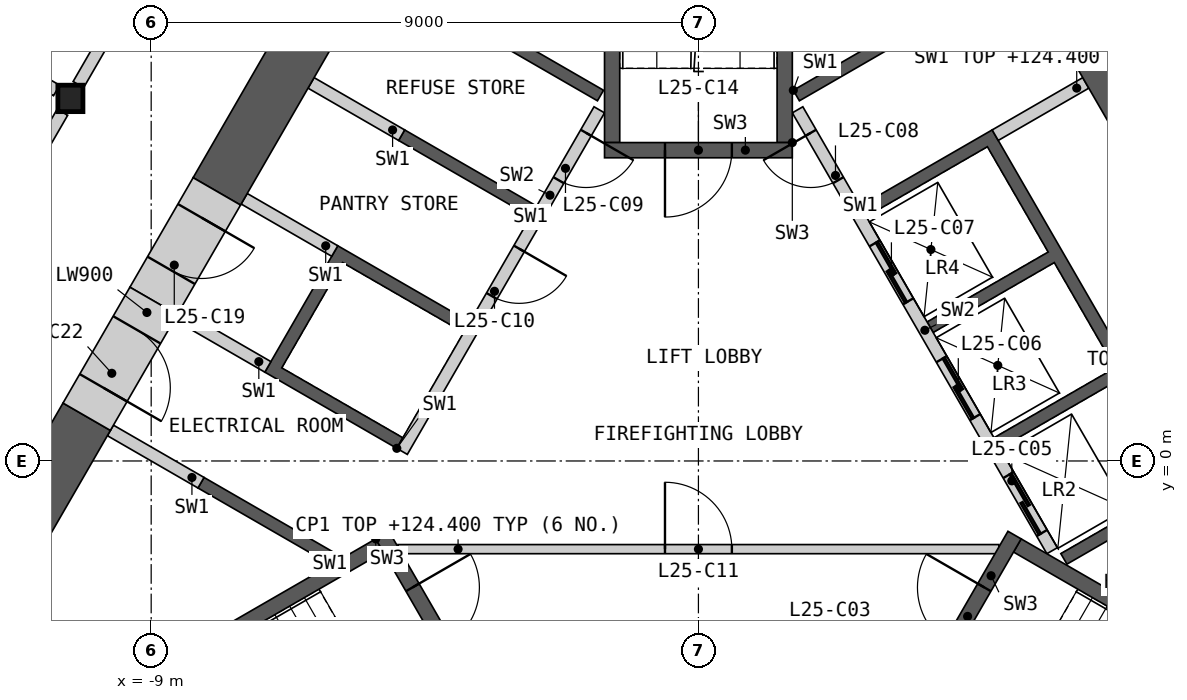
"""IFC4 building model, lengths in metres.
Left out: names, types, materials, properties, quantities, classifications, styles, units other than length and angle.
Written with IfcOpenShell. Run it as: python <this file> out.ifc"""

import sys

from ifc_helpers import new_model, si_unit, direction, frame, frame_2d, origin, origin_2d, place, context, subcontext, project, spatial, polyline, rectangle, i_section, outline, extrude, element, fill, save


model = new_model("IFC4")
c1 = context("Model", 3, precision=1e-05, world=origin(), true_north=direction((0.0, 1.0)))
c2 = subcontext(c1, "Body", "Model", "MODEL_VIEW")
j1 = project(units=[si_unit("LENGTHUNIT", "METRE"), si_unit("PLANEANGLEUNIT", "RADIAN")], contexts=[c1])
p1 = place(None, origin())
s1 = spatial("IfcSite", under=j1, at=p1, CompositionType="ELEMENT")
p2 = place(p1, origin())
s2 = spatial("IfcBuilding", under=s1, at=p2, CompositionType="ELEMENT")
p3 = place(p2, frame((0.0, 0.0, 120.6)))
s3 = spatial("IfcBuildingStorey", under=s2, at=p3, CompositionType="ELEMENT", Elevation=120.6)
p4 = place(p3, frame((-10.328, 5.963, 0.0), z_axis=(0.0, 0.0, 1.0), x_axis=(1.0, 0.0, 0.0)))
e1 = element("IfcColumn", 1, at=p4, inside=s3, PredefinedType="COLUMN", context=c2, shape_type="SweptSolid", body=[
    extrude(i_section(OverallWidth=0.412, OverallDepth=0.435, WebThickness=0.036, FlangeThickness=0.057, at=origin_2d()), origin(), (0.0, 0.0, 1.0), 4.2),
])
p5 = place(p3, origin())
e2 = element("IfcWall", 2, at=p5, inside=s3, PredefinedType="SHEAR", context=c2, shape_type="SweptSolid", body=[
    extrude(outline(polyline([(1.561, 6.097), (3.731, 7.35), (3.831, 7.177), (1.66, 5.924), (1.561, 6.097)])), origin(), (0.0, 0.0, 1.0), 3.8),
])
p6 = place(p3, origin())
e3 = element("IfcWall", 3, at=p6, inside=s3, PredefinedType="SHEAR", context=c2, shape_type="SweptSolid", body=[
    extrude(outline(polyline([(2.66, 4.192), (4.831, 5.445), (8.231, -0.444), (6.061, -1.697), (5.96, -1.524), (7.952, -0.374), (6.952, 1.358), (4.96, 0.208), (4.861, 0.381), (6.852, 1.531), (5.852, 3.263), (3.861, 2.113), (3.76, 2.287), (5.752, 3.437), (4.752, 5.169), (2.76, 4.019), (2.66, 4.192)])), origin(), (0.0, 0.0, 1.0), 3.8),
])
p7 = place(p3, frame((5.817, -1.476, 0.0), z_axis=(0.0, 0.0, 1.0), x_axis=(-0.500002616675, 0.866023893041, 0.0)))
e4 = element("IfcWall", 4, at=p7, inside=s3, PredefinedType="SOLIDWALL", context=c2, shape_type="SweptSolid", body=[
    extrude(rectangle(XDim=8.373, YDim=0.2, at=frame_2d((4.187, 0.0))), origin(), (0.0, 0.0, 1.0), 3.8),
])
p8 = place(p7, frame((0.337, 0.0, 0.0)))
e5 = element("IfcOpeningElement", 5, at=p8, cuts=e4, PredefinedType="OPENING", context=c2, shape_type="SweptSolid", body=[
    extrude(rectangle(XDim=1.1, YDim=2.1, at=frame_2d((0.55, 1.05))), frame((0.0, 0.11, 0.0), z_axis=(0.0, -1.0, 0.0), x_axis=(1.0, 0.0, 0.0)), (0.0, 0.0, 1.0), 0.22),
])
p9 = place(p7, frame((2.537, 0.0, 0.0)))
e6 = element("IfcOpeningElement", 6, at=p9, cuts=e4, PredefinedType="OPENING", context=c2, shape_type="SweptSolid", body=[
    extrude(rectangle(XDim=1.1, YDim=2.1, at=frame_2d((0.55, 1.05))), frame((0.0, 0.11, 0.0), z_axis=(0.0, -1.0, 0.0), x_axis=(1.0, 0.0, 0.0)), (0.0, 0.0, 1.0), 0.22),
])
p10 = place(p7, frame((4.737, 0.0, 0.0)))
e7 = element("IfcOpeningElement", 7, at=p10, cuts=e4, PredefinedType="OPENING", context=c2, shape_type="SweptSolid", body=[
    extrude(rectangle(XDim=1.1, YDim=2.1, at=frame_2d((0.55, 1.05))), frame((0.0, 0.11, 0.0), z_axis=(0.0, -1.0, 0.0), x_axis=(1.0, 0.0, 0.0)), (0.0, 0.0, 1.0), 0.22),
])
p11 = place(p7, frame((7.037, 0.0, 0.0)))
e8 = element("IfcOpeningElement", 8, at=p11, cuts=e4, PredefinedType="OPENING", context=c2, shape_type="SweptSolid", body=[
    extrude(rectangle(XDim=0.9, YDim=2.1, at=frame_2d((0.45, 1.05))), frame((0.0, 0.11, 0.0), z_axis=(0.0, -1.0, 0.0), x_axis=(1.0, 0.0, 0.0)), (0.0, 0.0, 1.0), 0.22),
])
p12 = place(p3, frame((4.881, 5.358, 0.0), z_axis=(0.0, 0.0, 1.0), x_axis=(0.866024871741, 0.500000921525, 0.0)))
e9 = element("IfcWall", 9, at=p12, inside=s3, PredefinedType="SHEAR", context=c2, shape_type="SweptSolid", body=[
    extrude(rectangle(XDim=1.72, YDim=0.2, at=frame_2d((0.86, 0.0))), origin(), (0.0, 0.0, 1.0), 3.8),
])
p13 = place(p3, origin())
e10 = element("IfcWall", 10, at=p13, inside=s3, PredefinedType="SHEAR", context=c2, shape_type="SweptSolid", body=[
    extrude(outline(polyline([(-6.061, -1.697), (-8.231, -0.444), (-8.131, -0.271), (-5.96, -1.524), (-6.061, -1.697)])), origin(), (0.0, 0.0, 1.0), 3.8),
])
p14 = place(p3, origin())
e11 = element("IfcWall", 11, at=p14, inside=s3, PredefinedType="SHEAR", context=c2, shape_type="SweptSolid", body=[
    extrude(outline(polyline([(-4.96, 0.208), (-7.131, 1.461), (-5.931, 3.54), (-3.76, 2.287), (-3.861, 2.113), (-5.852, 3.263), (-6.852, 1.531), (-4.861, 0.381), (-4.96, 0.208)])), origin(), (0.0, 0.0, 1.0), 3.8),
])
p15 = place(p3, origin())
e12 = element("IfcWall", 12, at=p15, inside=s3, PredefinedType="SHEAR", context=c2, shape_type="SweptSolid", body=[
    extrude(outline(polyline([(-2.76, 4.019), (-4.931, 5.272), (-4.831, 5.445), (-2.66, 4.192), (-2.76, 4.019)])), origin(), (0.0, 0.0, 1.0), 3.8),
])
p16 = place(p3, origin())
e13 = element("IfcWall", 13, at=p16, inside=s3, PredefinedType="SHEAR", context=c2, shape_type="SweptSolid", body=[
    extrude(outline(polyline([(-3.731, 7.35), (-1.561, 6.097), (-1.66, 5.924), (-3.831, 7.177), (-3.731, 7.35)])), origin(), (0.0, 0.0, 1.0), 3.8),
])
p17 = place(p3, frame((-1.631, 5.776, 0.0), z_axis=(0.0, 0.0, 1.0), x_axis=(-0.499992876559, -0.866029516466, 0.0)))
e14 = element("IfcWall", 14, at=p17, inside=s3, PredefinedType="SOLIDWALL", context=c2, shape_type="SweptSolid", body=[
    extrude(rectangle(XDim=6.486, YDim=0.2, at=frame_2d((3.243, 0.0))), origin(), (0.0, 0.0, 1.0), 3.8),
])
p18 = place(p17, frame((0.437, 0.0, 0.0)))
e15 = element("IfcOpeningElement", 15, at=p18, cuts=e14, PredefinedType="OPENING", context=c2, shape_type="SweptSolid", body=[
    extrude(rectangle(XDim=0.9, YDim=2.1, at=frame_2d((0.45, 1.05))), frame((0.0, 0.11, 0.0), z_axis=(0.0, -1.0, 0.0), x_axis=(1.0, 0.0, 0.0)), (0.0, 0.0, 1.0), 0.22),
])
p19 = place(p17, frame((2.637, 0.0, 0.0)))
e16 = element("IfcOpeningElement", 16, at=p19, cuts=e14, PredefinedType="OPENING", context=c2, shape_type="SweptSolid", body=[
    extrude(rectangle(XDim=0.9, YDim=2.1, at=frame_2d((0.45, 1.05))), frame((0.0, 0.11, 0.0), z_axis=(0.0, -1.0, 0.0), x_axis=(1.0, 0.0, 0.0)), (0.0, 0.0, 1.0), 0.22),
])
p20 = place(p3, frame((-4.881, 5.358, 0.0), z_axis=(0.0, 0.0, 1.0), x_axis=(-0.866024871741, 0.500000921525, 0.0)))
e17 = element("IfcWall", 17, at=p20, inside=s3, PredefinedType="SHEAR", context=c2, shape_type="SweptSolid", body=[
    extrude(rectangle(XDim=1.72, YDim=0.2, at=frame_2d((0.86, 0.0))), origin(), (0.0, 0.0, 1.0), 3.8),
])
p21 = place(p3, frame((-5.981, 3.453, 0.0), z_axis=(0.0, 0.0, 1.0), x_axis=(-0.866060346521, 0.499939472521, 0.0)))
e18 = element("IfcWall", 18, at=p21, inside=s3, PredefinedType="SHEAR", context=c2, shape_type="SweptSolid", body=[
    extrude(rectangle(XDim=1.72, YDim=0.2, at=frame_2d((0.86, 0.0))), origin(), (0.0, 0.0, 1.0), 3.8),
])
for number, where, z_axis, x_axis in (
    (19, (-7.081, 1.548, 0.0), (0.0, 0.0, 1.0), (-0.866, 0.5, 0.0)),
    (20, (-8.181, -0.357, 0.0), (0.0, 0.0, 1.0), (-0.866, 0.5, 0.0)),
):
    element("IfcWall", number, at=place(p3, frame(where, z_axis=z_axis, x_axis=x_axis)), inside=s3, PredefinedType="SHEAR", context=c2, shape_type="SweptSolid", body=[
        extrude(rectangle(XDim=1.72, YDim=0.2, at=frame_2d((0.86, 0.0))), origin(), (0.0, 0.0, 1.0), 3.8),
    ])
p22 = place(p3, frame((-4.941, -1.45, 0.0), z_axis=(0.0, 0.0, 1.0), x_axis=(1.0, 0.0, 0.0)))
e21 = element("IfcWall", 21, at=p22, inside=s3, PredefinedType="PARTITIONING", context=c2, shape_type="SweptSolid", body=[
    extrude(rectangle(XDim=9.882, YDim=0.15, at=frame_2d((4.941, 0.0))), origin(), (0.0, 0.0, 1.0), 3.8),
])
p23 = place(p22, frame((4.391, 0.0, 0.0)))
e22 = element("IfcOpeningElement", 22, at=p23, cuts=e21, PredefinedType="OPENING", context=c2, shape_type="SweptSolid", body=[
    extrude(rectangle(XDim=1.1, YDim=2.1, at=frame_2d((0.55, 1.05))), frame((0.0, 0.085, 0.0), z_axis=(0.0, -1.0, 0.0), x_axis=(1.0, 0.0, 0.0)), (0.0, 0.0, 1.0), 0.17),
])
p24 = place(p3, origin())
e23 = element("IfcWall", 23, at=p24, inside=s3, PredefinedType="SHEAR", context=c2, shape_type="SweptSolid", body=[
    extrude(outline(polyline([(-5.307, -1.281), (-10.374, -4.206), (-10.032, -4.298), (-5.182, -1.498), (-5.307, -1.281)])), origin(), (0.0, 0.0, 1.0), 3.8),
])
p25 = place(p3, frame((-5.199, -1.219, 0.0), z_axis=(0.0, 0.0, 1.0), x_axis=(0.499982516597, -0.866035497597, 0.0)))
e24 = element("IfcWall", 24, at=p25, inside=s3, PredefinedType="SHEAR", context=c2, shape_type="SweptSolid", body=[
    extrude(rectangle(XDim=3.088, YDim=0.25, at=frame_2d((1.544, 0.0))), origin(), (0.0, 0.0, 1.0), 3.8),
])
p26 = place(p25, frame((0.994, 0.0, 0.0)))
e25 = element("IfcOpeningElement", 25, at=p26, cuts=e24, PredefinedType="OPENING", context=c2, shape_type="SweptSolid", body=[
    extrude(rectangle(XDim=1.1, YDim=2.1, at=frame_2d((0.55, 1.05))), frame((0.0, 0.135, 0.0), z_axis=(0.0, -1.0, 0.0), x_axis=(1.0, 0.0, 0.0)), (0.0, 0.0, 1.0), 0.27),
])
p27 = place(p3, origin())
e26 = element("IfcWall", 26, at=p27, inside=s3, PredefinedType="SHEAR", context=c2, shape_type="SweptSolid", body=[
    extrude(outline(polyline([(10.032, -4.298), (10.374, -4.206), (5.307, -1.281), (5.182, -1.498), (10.032, -4.298)])), origin(), (0.0, 0.0, 1.0), 3.8),
])
p28 = place(p3, frame((3.655, -3.893, 0.0), z_axis=(0.0, 0.0, 1.0), x_axis=(0.499982516597, 0.866035497597, 0.0)))
e27 = element("IfcWall", 27, at=p28, inside=s3, PredefinedType="SHEAR", context=c2, shape_type="SweptSolid", body=[
    extrude(rectangle(XDim=3.088, YDim=0.25, at=frame_2d((1.544, 0.0))), origin(), (0.0, 0.0, 1.0), 3.8),
])
p29 = place(p28, frame((0.994, 0.0, 0.0)))
e28 = element("IfcOpeningElement", 28, at=p29, cuts=e27, PredefinedType="OPENING", context=c2, shape_type="SweptSolid", body=[
    extrude(rectangle(XDim=1.1, YDim=2.1, at=frame_2d((0.55, 1.05))), frame((0.0, 0.135, 0.0), z_axis=(0.0, -1.0, 0.0), x_axis=(1.0, 0.0, 0.0)), (0.0, 0.0, 1.0), 0.27),
])
p30 = place(p3, origin())
e29 = element("IfcWall", 29, at=p30, inside=s3, PredefinedType="SHEAR", context=c2, shape_type="SweptSolid", body=[
    extrude(outline(polyline([(1.544, 5.237), (1.544, 11.087), (1.294, 10.837), (1.294, 5.237), (1.544, 5.237)])), origin(), (0.0, 0.0, 1.0), 3.8),
])
p31 = place(p3, origin())
e30 = element("IfcWall", 30, at=p31, inside=s3, PredefinedType="SHEAR", context=c2, shape_type="SweptSolid", body=[
    extrude(outline(polyline([(-1.294, 10.837), (-1.544, 11.087), (-1.544, 5.237), (-1.294, 5.237), (-1.294, 10.837)])), origin(), (0.0, 0.0, 1.0), 3.8),
])
p32 = place(p3, frame((1.544, 5.112, 0.0), z_axis=(0.0, 0.0, 1.0), x_axis=(-1.0, 0.0, 0.0)))
e31 = element("IfcWall", 31, at=p32, inside=s3, PredefinedType="SHEAR", context=c2, shape_type="SweptSolid", body=[
    extrude(rectangle(XDim=3.088, YDim=0.25, at=frame_2d((1.544, 0.0))), origin(), (0.0, 0.0, 1.0), 3.8),
])
p33 = place(p32, frame((0.994, 0.0, 0.0)))
e32 = element("IfcOpeningElement", 32, at=p33, cuts=e31, PredefinedType="OPENING", context=c2, shape_type="SweptSolid", body=[
    extrude(rectangle(XDim=1.1, YDim=2.1, at=frame_2d((0.55, 1.05))), frame((0.0, 0.135, 0.0), z_axis=(0.0, -1.0, 0.0), x_axis=(1.0, 0.0, 0.0)), (0.0, 0.0, 1.0), 0.27),
])
p34 = place(p3, frame((7.91, 4.451, 0.0), z_axis=(0.0, 0.0, 1.0), x_axis=(-0.500005799286, 0.866022055539, 0.0)))
e33 = element("IfcWall", 33, at=p34, inside=s3, PredefinedType="SHEAR", context=c2, shape_type="SweptSolid", body=[
    extrude(rectangle(XDim=15.041, YDim=0.9, at=frame_2d((7.521, 0.0))), origin(), (0.0, 0.0, 1.0), 3.8),
])
p35 = place(p3, frame((-3.55, 12.004, 0.0), z_axis=(0.0, 0.0, 1.0), x_axis=(-0.499993245289, -0.866029303583, 0.0)))
e34 = element("IfcWall", 34, at=p35, inside=s3, PredefinedType="SHEAR", context=c2, shape_type="SweptSolid", body=[
    extrude(rectangle(XDim=8.741, YDim=0.9, at=frame_2d((4.37, 0.0))), origin(), (0.0, 0.0, 1.0), 3.8),
])
p36 = place(p3, frame((-10.06, 0.728, 0.0), z_axis=(0.0, 0.0, 1.0), x_axis=(-0.500021220092, -0.866013152012, 0.0)))
e35 = element("IfcWall", 35, at=p36, inside=s3, PredefinedType="SHEAR", context=c2, shape_type="SweptSolid", body=[
    extrude(rectangle(XDim=4.22, YDim=0.9, at=frame_2d((2.11, 0.0))), origin(), (0.0, 0.0, 1.0), 3.8),
])
p37 = place(p3, frame((-7.92, 4.434, 0.0), z_axis=(0.0, 0.0, 1.0), x_axis=(-0.499939227269, -0.866060488094, 0.0)))
e36 = element("IfcWall", 36, at=p37, inside=s3, PredefinedType="SHEAR", context=c2, shape_type="SweptSolid", body=[
    extrude(rectangle(XDim=2.08, YDim=0.9, at=frame_2d((1.04, 0.0))), origin(), (0.0, 0.0, 1.0), 3.8),
])
p38 = place(p37, frame((0.5, 0.0, 0.0)))
e37 = element("IfcOpeningElement", 37, at=p38, cuts=e36, PredefinedType="OPENING", context=c2, shape_type="SweptSolid", body=[
    extrude(rectangle(XDim=1.0, YDim=2.1, at=frame_2d((0.5, 1.05))), frame((0.0, 0.46, 0.0), z_axis=(0.0, -1.0, 0.0), x_axis=(1.0, 0.0, 0.0)), (0.0, 0.0, 1.0), 0.92),
])
p39 = place(p3, frame((-8.96, 2.633, 0.0), z_axis=(0.0, 0.0, 1.0), x_axis=(-0.50002983664, -0.866008176907, 0.0)))
e38 = element("IfcWall", 38, at=p39, inside=s3, PredefinedType="SHEAR", context=c2, shape_type="SweptSolid", body=[
    extrude(rectangle(XDim=2.2, YDim=0.9, at=frame_2d((1.1, 0.0))), origin(), (0.0, 0.0, 1.0), 3.8),
])
p40 = place(p39, frame((0.55, 0.0, 0.0)))
e39 = element("IfcOpeningElement", 39, at=p40, cuts=e38, PredefinedType="OPENING", context=c2, shape_type="SweptSolid", body=[
    extrude(rectangle(XDim=1.1, YDim=2.1, at=frame_2d((0.55, 1.05))), frame((0.0, 0.46, 0.0), z_axis=(0.0, -1.0, 0.0), x_axis=(1.0, 0.0, 0.0)), (0.0, 0.0, 1.0), 0.92),
])
p41 = place(p3, frame((-10.197, 6.19, 0.0), z_axis=(0.0, 0.0, 1.0), x_axis=(0.500012035596, 0.866018454918, 0.0)))
e40 = element("IfcWall", 40, at=p41, inside=s3, PredefinedType="PARTITIONING", context=c2, shape_type="SweptSolid", body=[
    extrude(rectangle(XDim=9.803, YDim=0.2, at=frame_2d((4.902, 0.0))), origin(), (0.0, 0.0, 1.0), 3.8),
])
p42 = place(p41, frame((1.851, 0.0, 0.0)))
e41 = element("IfcOpeningElement", 41, at=p42, cuts=e40, PredefinedType="OPENING", context=c2, shape_type="SweptSolid", body=[
    extrude(rectangle(XDim=1.0, YDim=2.1, at=frame_2d((0.5, 1.05))), frame((0.0, 0.11, 0.0), z_axis=(0.0, -1.0, 0.0), x_axis=(1.0, 0.0, 0.0)), (0.0, 0.0, 1.0), 0.22),
])
p43 = place(p3, frame((5.295, 14.68, 0.0), z_axis=(0.0, 0.0, 1.0), x_axis=(0.500012035596, -0.866018454918, 0.0)))
e42 = element("IfcWall", 42, at=p43, inside=s3, PredefinedType="PARTITIONING", context=c2, shape_type="SweptSolid", body=[
    extrude(rectangle(XDim=9.803, YDim=0.2, at=frame_2d((4.902, 0.0))), origin(), (0.0, 0.0, 1.0), 3.8),
])
p44 = place(p43, frame((4.376, 0.0, 0.0)))
e43 = element("IfcOpeningElement", 43, at=p44, cuts=e42, PredefinedType="OPENING", context=c2, shape_type="SweptSolid", body=[
    extrude(rectangle(XDim=0.95, YDim=2.1, at=frame_2d((0.475, 1.05))), frame((0.0, 0.11, 0.0), z_axis=(0.0, -1.0, 0.0), x_axis=(1.0, 0.0, 0.0)), (0.0, 0.0, 1.0), 0.22),
])
p45 = place(p3, frame((-15.402, -2.823, 0.0), z_axis=(0.0, 0.0, 1.0), x_axis=(0.500023237168, 0.866011987384, 0.0)))
e44 = element("IfcWall", 44, at=p45, inside=s3, PredefinedType="PARTITIONING", context=c2, shape_type="SweptSolid", body=[
    extrude(rectangle(XDim=9.883, YDim=0.2, at=frame_2d((4.942, 0.0))), origin(), (0.0, 0.0, 1.0), 3.8),
])
p46 = place(p45, frame((4.492, 0.0, 0.0)))
e45 = element("IfcOpeningElement", 45, at=p46, cuts=e44, PredefinedType="OPENING", context=c2, shape_type="SweptSolid", body=[
    extrude(rectangle(XDim=1.0, YDim=2.1, at=frame_2d((0.5, 1.05))), frame((0.0, 0.11, 0.0), z_axis=(0.0, -1.0, 0.0), x_axis=(1.0, 0.0, 0.0)), (0.0, 0.0, 1.0), 0.22),
])
p47 = place(p3, frame((-21.536, 12.434, 0.0), z_axis=(0.0, 0.0, 1.0), x_axis=(0.86602461759, -0.500001361726, 0.0)))
e46 = element("IfcWall", 46, at=p47, inside=s3, PredefinedType="PARTITIONING", context=c2, shape_type="SweptSolid", body=[
    extrude(rectangle(XDim=12.679, YDim=0.2, at=frame_2d((6.34, 0.0))), origin(), (0.0, 0.0, 1.0), 2.885),
])
p48 = place(p8, origin())
e47 = element("IfcDoor", 47, at=p48, inside=s3, OperationType="SLIDING_TO_LEFT", PredefinedType="DOOR", context=c2, shape_type="SweptSolid", body=[
    extrude(rectangle(XDim=1.1, YDim=2.1, at=frame_2d((0.55, 1.05))), frame((0.0, 0.025, 0.0), z_axis=(0.0, -1.0, 0.0), x_axis=(1.0, 0.0, 0.0)), (0.0, 0.0, 1.0), 0.05),
])
fill(e5, e47)
p49 = place(p9, origin())
e48 = element("IfcDoor", 48, at=p49, inside=s3, OperationType="SLIDING_TO_LEFT", PredefinedType="DOOR", context=c2, shape_type="SweptSolid", body=[
    extrude(rectangle(XDim=1.1, YDim=2.1, at=frame_2d((0.55, 1.05))), frame((0.0, 0.025, 0.0), z_axis=(0.0, -1.0, 0.0), x_axis=(1.0, 0.0, 0.0)), (0.0, 0.0, 1.0), 0.05),
])
fill(e6, e48)
p50 = place(p10, origin())
e49 = element("IfcDoor", 49, at=p50, inside=s3, OperationType="SLIDING_TO_LEFT", PredefinedType="DOOR", context=c2, shape_type="SweptSolid", body=[
    extrude(rectangle(XDim=1.1, YDim=2.1, at=frame_2d((0.55, 1.05))), frame((0.0, 0.025, 0.0), z_axis=(0.0, -1.0, 0.0), x_axis=(1.0, 0.0, 0.0)), (0.0, 0.0, 1.0), 0.05),
])
fill(e7, e49)
p51 = place(p11, origin())
e50 = element("IfcDoor", 50, at=p51, inside=s3, OperationType="SINGLE_SWING_RIGHT", PredefinedType="DOOR", context=c2, shape_type="SweptSolid", body=[
    extrude(rectangle(XDim=0.9, YDim=2.1, at=frame_2d((0.45, 1.05))), frame((0.0, 0.025, 0.0), z_axis=(0.0, -1.0, 0.0), x_axis=(1.0, 0.0, 0.0)), (0.0, 0.0, 1.0), 0.05),
])
fill(e8, e50)
p52 = place(p18, origin())
e51 = element("IfcDoor", 51, at=p52, inside=s3, OperationType="SINGLE_SWING_LEFT", PredefinedType="DOOR", context=c2, shape_type="SweptSolid", body=[
    extrude(rectangle(XDim=0.9, YDim=2.1, at=frame_2d((0.45, 1.05))), frame((0.0, 0.025, 0.0), z_axis=(0.0, -1.0, 0.0), x_axis=(1.0, 0.0, 0.0)), (0.0, 0.0, 1.0), 0.05),
])
fill(e15, e51)
p53 = place(p19, origin())
e52 = element("IfcDoor", 52, at=p53, inside=s3, OperationType="SINGLE_SWING_LEFT", PredefinedType="DOOR", context=c2, shape_type="SweptSolid", body=[
    extrude(rectangle(XDim=0.9, YDim=2.1, at=frame_2d((0.45, 1.05))), frame((0.0, 0.025, 0.0), z_axis=(0.0, -1.0, 0.0), x_axis=(1.0, 0.0, 0.0)), (0.0, 0.0, 1.0), 0.05),
])
fill(e16, e52)
p54 = place(p23, origin())
e53 = element("IfcDoor", 53, at=p54, inside=s3, OperationType="SINGLE_SWING_LEFT", PredefinedType="DOOR", context=c2, shape_type="SweptSolid", body=[
    extrude(rectangle(XDim=1.1, YDim=2.1, at=frame_2d((0.55, 1.05))), frame((0.0, 0.025, 0.0), z_axis=(0.0, -1.0, 0.0), x_axis=(1.0, 0.0, 0.0)), (0.0, 0.0, 1.0), 0.05),
])
fill(e22, e53)
p55 = place(p26, origin())
e54 = element("IfcDoor", 54, at=p55, inside=s3, OperationType="SINGLE_SWING_LEFT", PredefinedType="DOOR", context=c2, shape_type="SweptSolid", body=[
    extrude(rectangle(XDim=1.1, YDim=2.1, at=frame_2d((0.55, 1.05))), frame((0.0, 0.025, 0.0), z_axis=(0.0, -1.0, 0.0), x_axis=(1.0, 0.0, 0.0)), (0.0, 0.0, 1.0), 0.05),
])
fill(e25, e54)
p56 = place(p29, origin())
e55 = element("IfcDoor", 55, at=p56, inside=s3, OperationType="SINGLE_SWING_RIGHT", PredefinedType="DOOR", context=c2, shape_type="SweptSolid", body=[
    extrude(rectangle(XDim=1.1, YDim=2.1, at=frame_2d((0.55, 1.05))), frame((0.0, 0.025, 0.0), z_axis=(0.0, -1.0, 0.0), x_axis=(1.0, 0.0, 0.0)), (0.0, 0.0, 1.0), 0.05),
])
fill(e28, e55)
p57 = place(p33, origin())
e56 = element("IfcDoor", 56, at=p57, inside=s3, OperationType="SINGLE_SWING_RIGHT", PredefinedType="DOOR", context=c2, shape_type="SweptSolid", body=[
    extrude(rectangle(XDim=1.1, YDim=2.1, at=frame_2d((0.55, 1.05))), frame((0.0, 0.025, 0.0), z_axis=(0.0, -1.0, 0.0), x_axis=(1.0, 0.0, 0.0)), (0.0, 0.0, 1.0), 0.05),
])
fill(e32, e56)
p58 = place(p38, origin())
e57 = element("IfcDoor", 57, at=p58, inside=s3, OperationType="SINGLE_SWING_LEFT", PredefinedType="DOOR", context=c2, shape_type="SweptSolid", body=[
    extrude(rectangle(XDim=1.0, YDim=2.1, at=frame_2d((0.5, 1.05))), frame((0.0, 0.205, 0.0), z_axis=(0.0, -1.0, 0.0), x_axis=(1.0, 0.0, 0.0)), (0.0, 0.0, 1.0), 0.05),
])
fill(e37, e57)
p59 = place(p40, origin())
e58 = element("IfcDoor", 58, at=p59, inside=s3, OperationType="SINGLE_SWING_RIGHT", PredefinedType="DOOR", context=c2, shape_type="SweptSolid", body=[
    extrude(rectangle(XDim=1.1, YDim=2.1, at=frame_2d((0.55, 1.05))), frame((0.0, 0.205, 0.0), z_axis=(0.0, -1.0, 0.0), x_axis=(1.0, 0.0, 0.0)), (0.0, 0.0, 1.0), 0.05),
])
fill(e39, e58)
save(model, sys.argv[1])
